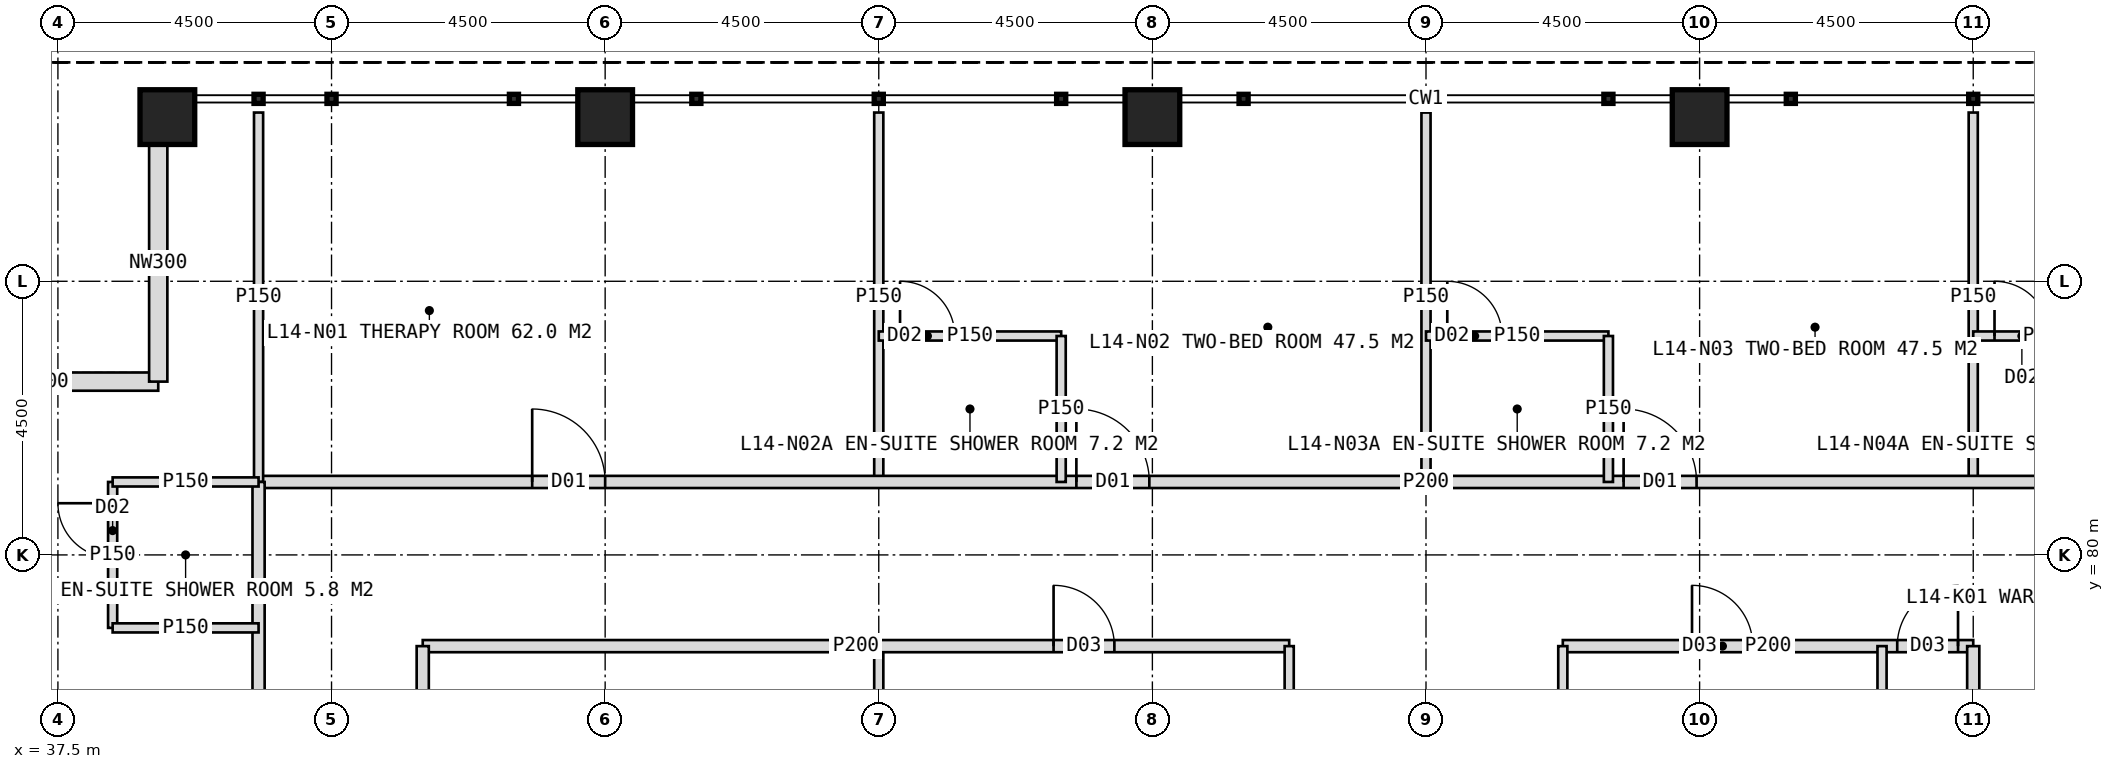
"""IFC4 building model, lengths in metres.
Left out: names, types, materials, properties, quantities, classifications, styles, units other than length and angle.
Written with IfcOpenShell. Run it as: python <this file> out.ifc"""

import sys

from ifc_helpers import new_model, si_unit, direction, frame, frame_2d, origin, origin_2d, place, context, subcontext, project, spatial, rectangle, hollow_rectangle, extrude, element, fill, save


model = new_model("IFC4")
c1 = context("Model", 3, precision=1e-05, world=origin(), true_north=direction((0.0, 1.0)))
c2 = subcontext(c1, "Body", "Model", "MODEL_VIEW")
j1 = project(units=[si_unit("LENGTHUNIT", "METRE"), si_unit("PLANEANGLEUNIT", "RADIAN")], contexts=[c1])
p1 = place(None, origin())
s1 = spatial("IfcSite", under=j1, at=p1, CompositionType="ELEMENT")
p2 = place(p1, origin())
s2 = spatial("IfcBuilding", under=s1, at=p2, CompositionType="ELEMENT")
p3 = place(p2, frame((0.0, 0.0, 63.0)))
s3 = spatial("IfcBuildingStorey", under=s2, at=p3, CompositionType="ELEMENT", Elevation=63.0)
for number, where, z_axis, x_axis in (
    (1, (39.3, 87.2, 0.0), (0.0, 0.0, 1.0), (1.0, 0.0, 0.0)),
    (2, (46.5, 87.2, 0.0), (0.0, 0.0, 1.0), (1.0, 0.0, 0.0)),
    (3, (55.5, 87.2, 0.0), (0.0, 0.0, 1.0), (1.0, 0.0, 0.0)),
    (4, (64.5, 87.2, 0.0), (0.0, 0.0, 1.0), (1.0, 0.0, 0.0)),
):
    element("IfcColumn", number, at=place(p3, frame(where, z_axis=z_axis, x_axis=x_axis)), inside=s3, PredefinedType="COLUMN", context=c2, shape_type="SweptSolid", body=[
        extrude(hollow_rectangle(XDim=0.9, YDim=0.9, WallThickness=0.08, at=origin_2d()), origin(), (0.0, 0.0, 1.0), 4.0),
    ])
for number, where, z_axis, x_axis in (
    (5, (35.25, 82.85, 0.0), (0.0, 0.0, 1.0), (1.0, 0.0, 0.0)),
    (6, (39.15, 82.85, 0.0), (0.0, 0.0, 1.0), (0.0, 1.0, 0.0)),
):
    element("IfcWall", number, at=place(p3, frame(where, z_axis=z_axis, x_axis=x_axis)), inside=s3, PredefinedType="ELEMENTEDWALL", context=c2, shape_type="SweptSolid", body=[
        extrude(rectangle(XDim=3.9, YDim=0.3, at=frame_2d((1.95, 0.0))), origin(), (0.0, 0.0, 1.0), 2.95),
    ])
p4 = place(p3, frame((51.0, 81.2, 0.0), z_axis=(0.0, 0.0, 1.0), x_axis=(0.0, 1.0, 0.0)))
e7 = element("IfcWall", 7, at=p4, inside=s3, PredefinedType="PARTITIONING", context=c2, shape_type="SweptSolid", body=[
    extrude(rectangle(XDim=6.075, YDim=0.15, at=frame_2d((3.038, 0.0))), origin(), (0.0, 0.0, 1.0), 3.75),
])
p5 = place(p3, frame((60.0, 81.2, 0.0), z_axis=(0.0, 0.0, 1.0), x_axis=(0.0, 1.0, 0.0)))
e8 = element("IfcWall", 8, at=p5, inside=s3, PredefinedType="PARTITIONING", context=c2, shape_type="SweptSolid", body=[
    extrude(rectangle(XDim=6.075, YDim=0.15, at=frame_2d((3.038, 0.0))), origin(), (0.0, 0.0, 1.0), 2.75),
])
p6 = place(p3, frame((69.0, 81.2, 0.0), z_axis=(0.0, 0.0, 1.0), x_axis=(0.0, 1.0, 0.0)))
e9 = element("IfcWall", 9, at=p6, inside=s3, PredefinedType="PARTITIONING", context=c2, shape_type="SweptSolid", body=[
    extrude(rectangle(XDim=6.075, YDim=0.15, at=frame_2d((3.038, 0.0))), origin(), (0.0, 0.0, 1.0), 3.75),
])
p7 = place(p3, frame((40.8, 81.2, 0.0), z_axis=(0.0, 0.0, 1.0), x_axis=(1.0, 0.0, 0.0)))
e10 = element("IfcWall", 10, at=p7, inside=s3, PredefinedType="PARTITIONING", context=c2, shape_type="SweptSolid", body=[
    extrude(rectangle(XDim=38.4, YDim=0.2, at=frame_2d((19.2, 0.0))), origin(), (0.0, 0.0, 1.0), 3.75),
])
p8 = place(p7, frame((4.5, 0.0, 0.0)))
e11 = element("IfcOpeningElement", 11, at=p8, cuts=e10, PredefinedType="OPENING", context=c2, shape_type="SweptSolid", body=[
    extrude(rectangle(XDim=1.2, YDim=2.2, at=frame_2d((0.6, 1.1))), frame((0.0, 0.11, 0.0), z_axis=(0.0, -1.0, 0.0), x_axis=(1.0, 0.0, 0.0)), (0.0, 0.0, 1.0), 0.22),
])
p9 = place(p7, frame((13.45, 0.0, 0.0)))
e12 = element("IfcOpeningElement", 12, at=p9, cuts=e10, PredefinedType="OPENING", context=c2, shape_type="SweptSolid", body=[
    extrude(rectangle(XDim=1.2, YDim=2.2, at=frame_2d((0.6, 1.1))), frame((0.0, 0.11, 0.0), z_axis=(0.0, -1.0, 0.0), x_axis=(1.0, 0.0, 0.0)), (0.0, 0.0, 1.0), 0.22),
])
p10 = place(p7, frame((22.45, 0.0, 0.0)))
e13 = element("IfcOpeningElement", 13, at=p10, cuts=e10, PredefinedType="OPENING", context=c2, shape_type="SweptSolid", body=[
    extrude(rectangle(XDim=1.2, YDim=2.2, at=frame_2d((0.6, 1.1))), frame((0.0, 0.11, 0.0), z_axis=(0.0, -1.0, 0.0), x_axis=(1.0, 0.0, 0.0)), (0.0, 0.0, 1.0), 0.22),
])
p11 = place(p7, frame((30.85, 0.0, 0.0)))
e14 = element("IfcOpeningElement", 14, at=p11, cuts=e10, PredefinedType="OPENING", context=c2, shape_type="SweptSolid", body=[
    extrude(rectangle(XDim=1.2, YDim=2.2, at=frame_2d((0.6, 1.1))), frame((0.0, 0.11, 0.0), z_axis=(0.0, -1.0, 0.0), x_axis=(1.0, 0.0, 0.0)), (0.0, 0.0, 1.0), 0.22),
])
p12 = place(p3, frame((40.8, 81.2, 0.0), z_axis=(0.0, 0.0, 1.0), x_axis=(0.0, 1.0, 0.0)))
e15 = element("IfcWall", 15, at=p12, inside=s3, PredefinedType="PARTITIONING", context=c2, shape_type="SweptSolid", body=[
    extrude(rectangle(XDim=6.075, YDim=0.15, at=frame_2d((3.038, 0.0))), origin(), (0.0, 0.0, 1.0), 3.75),
])
p13 = place(p3, frame((51.0, 83.6, 0.0), z_axis=(0.0, 0.0, 1.0), x_axis=(1.0, 0.0, 0.0)))
e16 = element("IfcWall", 16, at=p13, inside=s3, PredefinedType="PARTITIONING", context=c2, shape_type="SweptSolid", body=[
    extrude(rectangle(XDim=3.0, YDim=0.15, at=frame_2d((1.5, 0.0))), origin(), (0.0, 0.0, 1.0), 3.75),
])
p14 = place(p13, frame((0.35, 0.0, 0.0)))
e17 = element("IfcOpeningElement", 17, at=p14, cuts=e16, PredefinedType="OPENING", context=c2, shape_type="SweptSolid", body=[
    extrude(rectangle(XDim=0.9, YDim=2.1, at=frame_2d((0.45, 1.05))), frame((0.0, 0.085, 0.0), z_axis=(0.0, -1.0, 0.0), x_axis=(1.0, 0.0, 0.0)), (0.0, 0.0, 1.0), 0.17),
])
p15 = place(p3, frame((54.0, 81.2, 0.0), z_axis=(0.0, 0.0, 1.0), x_axis=(0.0, 1.0, 0.0)))
e18 = element("IfcWall", 18, at=p15, inside=s3, PredefinedType="PARTITIONING", context=c2, shape_type="SweptSolid", body=[
    extrude(rectangle(XDim=2.4, YDim=0.15, at=frame_2d((1.2, 0.0))), origin(), (0.0, 0.0, 1.0), 3.75),
])
p16 = place(p3, frame((60.0, 83.6, 0.0), z_axis=(0.0, 0.0, 1.0), x_axis=(1.0, 0.0, 0.0)))
e19 = element("IfcWall", 19, at=p16, inside=s3, PredefinedType="PARTITIONING", context=c2, shape_type="SweptSolid", body=[
    extrude(rectangle(XDim=3.0, YDim=0.15, at=frame_2d((1.5, 0.0))), origin(), (0.0, 0.0, 1.0), 3.75),
])
p17 = place(p16, frame((0.35, 0.0, 0.0)))
e20 = element("IfcOpeningElement", 20, at=p17, cuts=e19, PredefinedType="OPENING", context=c2, shape_type="SweptSolid", body=[
    extrude(rectangle(XDim=0.9, YDim=2.1, at=frame_2d((0.45, 1.05))), frame((0.0, 0.085, 0.0), z_axis=(0.0, -1.0, 0.0), x_axis=(1.0, 0.0, 0.0)), (0.0, 0.0, 1.0), 0.17),
])
p18 = place(p3, frame((63.0, 81.2, 0.0), z_axis=(0.0, 0.0, 1.0), x_axis=(0.0, 1.0, 0.0)))
e21 = element("IfcWall", 21, at=p18, inside=s3, PredefinedType="PARTITIONING", context=c2, shape_type="SweptSolid", body=[
    extrude(rectangle(XDim=2.4, YDim=0.15, at=frame_2d((1.2, 0.0))), origin(), (0.0, 0.0, 1.0), 3.75),
])
p19 = place(p3, frame((69.0, 83.6, 0.0), z_axis=(0.0, 0.0, 1.0), x_axis=(1.0, 0.0, 0.0)))
e22 = element("IfcWall", 22, at=p19, inside=s3, PredefinedType="PARTITIONING", context=c2, shape_type="SweptSolid", body=[
    extrude(rectangle(XDim=2.4, YDim=0.15, at=frame_2d((1.2, 0.0))), origin(), (0.0, 0.0, 1.0), 3.75),
])
p20 = place(p19, frame((0.35, 0.0, 0.0)))
e23 = element("IfcOpeningElement", 23, at=p20, cuts=e22, PredefinedType="OPENING", context=c2, shape_type="SweptSolid", body=[
    extrude(rectangle(XDim=0.9, YDim=2.1, at=frame_2d((0.45, 1.05))), frame((0.0, 0.085, 0.0), z_axis=(0.0, -1.0, 0.0), x_axis=(1.0, 0.0, 0.0)), (0.0, 0.0, 1.0), 0.17),
])
p21 = place(p3, frame((51.0, 71.0, 0.0), z_axis=(0.0, 0.0, 1.0), x_axis=(0.0, 1.0, 0.0)))
e24 = element("IfcWall", 24, at=p21, inside=s3, PredefinedType="PARTITIONING", context=c2, shape_type="SweptSolid", body=[
    extrude(rectangle(XDim=7.5, YDim=0.15, at=frame_2d((3.75, 0.0))), origin(), (0.0, 0.0, 1.0), 3.75),
])
p22 = place(p3, frame((43.5, 78.5, 0.0), z_axis=(0.0, 0.0, 1.0), x_axis=(1.0, 0.0, 0.0)))
e25 = element("IfcWall", 25, at=p22, inside=s3, PredefinedType="PARTITIONING", context=c2, shape_type="SweptSolid", body=[
    extrude(rectangle(XDim=14.25, YDim=0.2, at=frame_2d((7.125, 0.0))), origin(), (0.0, 0.0, 1.0), 3.75),
])
p23 = place(p22, frame((10.375, 0.0, 0.0)))
e26 = element("IfcOpeningElement", 26, at=p23, cuts=e25, PredefinedType="OPENING", context=c2, shape_type="SweptSolid", body=[
    extrude(rectangle(XDim=1.0, YDim=2.1, at=frame_2d((0.5, 1.05))), frame((0.0, 0.11, 0.0), z_axis=(0.0, -1.0, 0.0), x_axis=(1.0, 0.0, 0.0)), (0.0, 0.0, 1.0), 0.22),
])
p24 = place(p3, frame((62.25, 78.5, 0.0), z_axis=(0.0, 0.0, 1.0), x_axis=(1.0, 0.0, 0.0)))
e27 = element("IfcWall", 27, at=p24, inside=s3, PredefinedType="PARTITIONING", context=c2, shape_type="SweptSolid", body=[
    extrude(rectangle(XDim=6.75, YDim=0.2, at=frame_2d((3.375, 0.0))), origin(), (0.0, 0.0, 1.0), 3.75),
])
p25 = place(p24, frame((2.125, 0.0, 0.0)))
e28 = element("IfcOpeningElement", 28, at=p25, cuts=e27, PredefinedType="OPENING", context=c2, shape_type="SweptSolid", body=[
    extrude(rectangle(XDim=1.0, YDim=2.1, at=frame_2d((0.5, 1.05))), frame((0.0, 0.11, 0.0), z_axis=(0.0, -1.0, 0.0), x_axis=(1.0, 0.0, 0.0)), (0.0, 0.0, 1.0), 0.22),
])
p26 = place(p24, frame((5.5, 0.0, 0.0)))
e29 = element("IfcOpeningElement", 29, at=p26, cuts=e27, PredefinedType="OPENING", context=c2, shape_type="SweptSolid", body=[
    extrude(rectangle(XDim=1.0, YDim=2.1, at=frame_2d((0.5, 1.05))), frame((0.0, 0.11, 0.0), z_axis=(0.0, -1.0, 0.0), x_axis=(1.0, 0.0, 0.0)), (0.0, 0.0, 1.0), 0.22),
])
p27 = place(p3, frame((57.75, 71.0, 0.0), z_axis=(0.0, 0.0, 1.0), x_axis=(0.0, 1.0, 0.0)))
e30 = element("IfcWall", 30, at=p27, inside=s3, PredefinedType="PARTITIONING", context=c2, shape_type="SweptSolid", body=[
    extrude(rectangle(XDim=7.5, YDim=0.15, at=frame_2d((3.75, 0.0))), origin(), (0.0, 0.0, 1.0), 3.75),
])
p28 = place(p27, frame((0.6, 0.0, 0.0)))
e31 = element("IfcOpeningElement", 31, at=p28, cuts=e30, PredefinedType="OPENING", context=c2, shape_type="SweptSolid", body=[
    extrude(rectangle(XDim=0.9, YDim=2.1, at=frame_2d((0.45, 1.05))), frame((0.0, 0.085, 0.0), z_axis=(0.0, -1.0, 0.0), x_axis=(1.0, 0.0, 0.0)), (0.0, 0.0, 1.0), 0.17),
])
p29 = place(p3, frame((62.25, 71.0, 0.0), z_axis=(0.0, 0.0, 1.0), x_axis=(0.0, 1.0, 0.0)))
e32 = element("IfcWall", 32, at=p29, inside=s3, PredefinedType="PARTITIONING", context=c2, shape_type="SweptSolid", body=[
    extrude(rectangle(XDim=7.5, YDim=0.15, at=frame_2d((3.75, 0.0))), origin(), (0.0, 0.0, 1.0), 3.75),
])
p30 = place(p29, frame((0.6, 0.0, 0.0)))
e33 = element("IfcOpeningElement", 33, at=p30, cuts=e32, PredefinedType="OPENING", context=c2, shape_type="SweptSolid", body=[
    extrude(rectangle(XDim=0.9, YDim=2.1, at=frame_2d((0.45, 1.05))), frame((0.0, 0.085, 0.0), z_axis=(0.0, -1.0, 0.0), x_axis=(1.0, 0.0, 0.0)), (0.0, 0.0, 1.0), 0.17),
])
p31 = place(p3, frame((67.5, 71.0, 0.0), z_axis=(0.0, 0.0, 1.0), x_axis=(0.0, 1.0, 0.0)))
e34 = element("IfcWall", 34, at=p31, inside=s3, PredefinedType="PARTITIONING", context=c2, shape_type="SweptSolid", body=[
    extrude(rectangle(XDim=7.5, YDim=0.15, at=frame_2d((3.75, 0.0))), origin(), (0.0, 0.0, 1.0), 3.75),
])
p32 = place(p3, frame((40.8, 42.8, 0.0), z_axis=(0.0, 0.0, 1.0), x_axis=(0.0, 1.0, 0.0)))
e35 = element("IfcWall", 35, at=p32, inside=s3, PredefinedType="PARTITIONING", context=c2, shape_type="SweptSolid", body=[
    extrude(rectangle(XDim=38.4, YDim=0.2, at=frame_2d((19.2, 0.0))), origin(), (0.0, 0.0, 1.0), 3.75),
])
p33 = place(p32, frame((3.25, 0.0, 0.0)))
e36 = element("IfcOpeningElement", 36, at=p33, cuts=e35, PredefinedType="OPENING", context=c2, shape_type="SweptSolid", body=[
    extrude(rectangle(XDim=1.2, YDim=2.2, at=frame_2d((0.6, 1.1))), frame((0.0, 0.11, 0.0), z_axis=(0.0, -1.0, 0.0), x_axis=(1.0, 0.0, 0.0)), (0.0, 0.0, 1.0), 0.22),
])
p34 = place(p32, frame((9.85, 0.0, 0.0)))
e37 = element("IfcOpeningElement", 37, at=p34, cuts=e35, PredefinedType="OPENING", context=c2, shape_type="SweptSolid", body=[
    extrude(rectangle(XDim=1.2, YDim=2.2, at=frame_2d((0.6, 1.1))), frame((0.0, 0.11, 0.0), z_axis=(0.0, -1.0, 0.0), x_axis=(1.0, 0.0, 0.0)), (0.0, 0.0, 1.0), 0.22),
])
p35 = place(p32, frame((15.85, 0.0, 0.0)))
e38 = element("IfcOpeningElement", 38, at=p35, cuts=e35, PredefinedType="OPENING", context=c2, shape_type="SweptSolid", body=[
    extrude(rectangle(XDim=1.2, YDim=2.2, at=frame_2d((0.6, 1.1))), frame((0.0, 0.11, 0.0), z_axis=(0.0, -1.0, 0.0), x_axis=(1.0, 0.0, 0.0)), (0.0, 0.0, 1.0), 0.22),
])
p36 = place(p32, frame((22.45, 0.0, 0.0)))
e39 = element("IfcOpeningElement", 39, at=p36, cuts=e35, PredefinedType="OPENING", context=c2, shape_type="SweptSolid", body=[
    extrude(rectangle(XDim=1.2, YDim=2.2, at=frame_2d((0.6, 1.1))), frame((0.0, 0.11, 0.0), z_axis=(0.0, -1.0, 0.0), x_axis=(1.0, 0.0, 0.0)), (0.0, 0.0, 1.0), 0.22),
])
p37 = place(p32, frame((30.85, 0.0, 0.0)))
e40 = element("IfcOpeningElement", 40, at=p37, cuts=e35, PredefinedType="OPENING", context=c2, shape_type="SweptSolid", body=[
    extrude(rectangle(XDim=1.2, YDim=2.2, at=frame_2d((0.6, 1.1))), frame((0.0, 0.11, 0.0), z_axis=(0.0, -1.0, 0.0), x_axis=(1.0, 0.0, 0.0)), (0.0, 0.0, 1.0), 0.22),
])
p38 = place(p3, frame((38.4, 78.8, 0.0), z_axis=(0.0, 0.0, 1.0), x_axis=(0.0, 1.0, 0.0)))
e41 = element("IfcWall", 41, at=p38, inside=s3, PredefinedType="PARTITIONING", context=c2, shape_type="SweptSolid", body=[
    extrude(rectangle(XDim=2.4, YDim=0.15, at=frame_2d((1.2, 0.0))), origin(), (0.0, 0.0, 1.0), 3.75),
])
p39 = place(p38, frame((1.15, 0.0, 0.0)))
e42 = element("IfcOpeningElement", 42, at=p39, cuts=e41, PredefinedType="OPENING", context=c2, shape_type="SweptSolid", body=[
    extrude(rectangle(XDim=0.9, YDim=2.1, at=frame_2d((0.45, 1.05))), frame((0.0, 0.085, 0.0), z_axis=(0.0, -1.0, 0.0), x_axis=(1.0, 0.0, 0.0)), (0.0, 0.0, 1.0), 0.17),
])
for number, where, z_axis, x_axis in (
    (43, (40.8, 78.8, 0.0), (0.0, 0.0, 1.0), (-1.0, 0.0, 0.0)),
    (44, (40.8, 81.2, 0.0), (0.0, 0.0, 1.0), (-1.0, 0.0, 0.0)),
):
    element("IfcWall", number, at=place(p3, frame(where, z_axis=z_axis, x_axis=x_axis)), inside=s3, PredefinedType="PARTITIONING", context=c2, shape_type="SweptSolid", body=[
        extrude(rectangle(XDim=2.4, YDim=0.15, at=frame_2d((1.2, 0.0))), origin(), (0.0, 0.0, 1.0), 3.75),
    ])
p40 = place(p3, frame((43.5, 62.0, 0.0), z_axis=(0.0, 0.0, 1.0), x_axis=(0.0, 1.0, 0.0)))
e45 = element("IfcWall", 45, at=p40, inside=s3, PredefinedType="PARTITIONING", context=c2, shape_type="SweptSolid", body=[
    extrude(rectangle(XDim=16.5, YDim=0.2, at=frame_2d((8.25, 0.0))), origin(), (0.0, 0.0, 1.0), 3.75),
])
p41 = place(p40, frame((2.5, 0.0, 0.0)))
e46 = element("IfcOpeningElement", 46, at=p41, cuts=e45, PredefinedType="OPENING", context=c2, shape_type="SweptSolid", body=[
    extrude(rectangle(XDim=1.0, YDim=2.1, at=frame_2d((0.5, 1.05))), frame((0.0, 0.11, 0.0), z_axis=(0.0, -1.0, 0.0), x_axis=(1.0, 0.0, 0.0)), (0.0, 0.0, 1.0), 0.22),
])
p42 = place(p40, frame((7.75, 0.0, 0.0)))
e47 = element("IfcOpeningElement", 47, at=p42, cuts=e45, PredefinedType="OPENING", context=c2, shape_type="SweptSolid", body=[
    extrude(rectangle(XDim=1.0, YDim=2.1, at=frame_2d((0.5, 1.05))), frame((0.0, 0.11, 0.0), z_axis=(0.0, -1.0, 0.0), x_axis=(1.0, 0.0, 0.0)), (0.0, 0.0, 1.0), 0.22),
])
p43 = place(p40, frame((13.0, 0.0, 0.0)))
e48 = element("IfcOpeningElement", 48, at=p43, cuts=e45, PredefinedType="OPENING", context=c2, shape_type="SweptSolid", body=[
    extrude(rectangle(XDim=1.0, YDim=2.1, at=frame_2d((0.5, 1.05))), frame((0.0, 0.11, 0.0), z_axis=(0.0, -1.0, 0.0), x_axis=(1.0, 0.0, 0.0)), (0.0, 0.0, 1.0), 0.22),
])
p44 = place(p3, frame((69.0, 75.1, 0.0), z_axis=(0.0, 0.0, 1.0), x_axis=(0.0, 1.0, 0.0)))
e49 = element("IfcWall", 49, at=p44, inside=s3, PredefinedType="PARTITIONING", context=c2, shape_type="SweptSolid", body=[
    extrude(rectangle(XDim=3.4, YDim=0.2, at=frame_2d((1.7, 0.0))), origin(), (0.0, 0.0, 1.0), 3.75),
])
p45 = place(p8, origin())
e50 = element("IfcDoor", 50, at=p45, inside=s3, OperationType="SINGLE_SWING_LEFT", PredefinedType="DOOR", context=c2, shape_type="SweptSolid", body=[
    extrude(rectangle(XDim=1.2, YDim=2.2, at=frame_2d((0.6, 1.1))), frame((0.0, 0.025, 0.0), z_axis=(0.0, -1.0, 0.0), x_axis=(1.0, 0.0, 0.0)), (0.0, 0.0, 1.0), 0.05),
])
fill(e11, e50)
p46 = place(p9, origin())
e51 = element("IfcDoor", 51, at=p46, inside=s3, OperationType="SINGLE_SWING_LEFT", PredefinedType="DOOR", context=c2, shape_type="SweptSolid", body=[
    extrude(rectangle(XDim=1.2, YDim=2.2, at=frame_2d((0.6, 1.1))), frame((0.0, 0.025, 0.0), z_axis=(0.0, -1.0, 0.0), x_axis=(1.0, 0.0, 0.0)), (0.0, 0.0, 1.0), 0.05),
])
fill(e12, e51)
p47 = place(p14, origin())
e52 = element("IfcDoor", 52, at=p47, inside=s3, OperationType="SINGLE_SWING_LEFT", PredefinedType="DOOR", context=c2, shape_type="SweptSolid", body=[
    extrude(rectangle(XDim=0.9, YDim=2.1, at=frame_2d((0.45, 1.05))), frame((0.0, 0.025, 0.0), z_axis=(0.0, -1.0, 0.0), x_axis=(1.0, 0.0, 0.0)), (0.0, 0.0, 1.0), 0.05),
])
fill(e17, e52)
p48 = place(p10, origin())
e53 = element("IfcDoor", 53, at=p48, inside=s3, OperationType="SINGLE_SWING_LEFT", PredefinedType="DOOR", context=c2, shape_type="SweptSolid", body=[
    extrude(rectangle(XDim=1.2, YDim=2.2, at=frame_2d((0.6, 1.1))), frame((0.0, 0.025, 0.0), z_axis=(0.0, -1.0, 0.0), x_axis=(1.0, 0.0, 0.0)), (0.0, 0.0, 1.0), 0.05),
])
fill(e13, e53)
p49 = place(p17, origin())
e54 = element("IfcDoor", 54, at=p49, inside=s3, OperationType="SINGLE_SWING_LEFT", PredefinedType="DOOR", context=c2, shape_type="SweptSolid", body=[
    extrude(rectangle(XDim=0.9, YDim=2.1, at=frame_2d((0.45, 1.05))), frame((0.0, 0.025, 0.0), z_axis=(0.0, -1.0, 0.0), x_axis=(1.0, 0.0, 0.0)), (0.0, 0.0, 1.0), 0.05),
])
fill(e20, e54)
p50 = place(p20, origin())
e55 = element("IfcDoor", 55, at=p50, inside=s3, OperationType="SINGLE_SWING_LEFT", PredefinedType="DOOR", context=c2, shape_type="SweptSolid", body=[
    extrude(rectangle(XDim=0.9, YDim=2.1, at=frame_2d((0.45, 1.05))), frame((0.0, 0.025, 0.0), z_axis=(0.0, -1.0, 0.0), x_axis=(1.0, 0.0, 0.0)), (0.0, 0.0, 1.0), 0.05),
])
fill(e23, e55)
p51 = place(p23, origin())
e56 = element("IfcDoor", 56, at=p51, inside=s3, OperationType="SINGLE_SWING_LEFT", PredefinedType="DOOR", context=c2, shape_type="SweptSolid", body=[
    extrude(rectangle(XDim=1.0, YDim=2.1, at=frame_2d((0.5, 1.05))), frame((0.0, 0.025, 0.0), z_axis=(0.0, -1.0, 0.0), x_axis=(1.0, 0.0, 0.0)), (0.0, 0.0, 1.0), 0.05),
])
fill(e26, e56)
p52 = place(p25, origin())
e57 = element("IfcDoor", 57, at=p52, inside=s3, OperationType="SINGLE_SWING_LEFT", PredefinedType="DOOR", context=c2, shape_type="SweptSolid", body=[
    extrude(rectangle(XDim=1.0, YDim=2.1, at=frame_2d((0.5, 1.05))), frame((0.0, 0.025, 0.0), z_axis=(0.0, -1.0, 0.0), x_axis=(1.0, 0.0, 0.0)), (0.0, 0.0, 1.0), 0.05),
])
fill(e28, e57)
p53 = place(p26, origin())
e58 = element("IfcDoor", 58, at=p53, inside=s3, OperationType="SINGLE_SWING_RIGHT", PredefinedType="DOOR", context=c2, shape_type="SweptSolid", body=[
    extrude(rectangle(XDim=1.0, YDim=2.1, at=frame_2d((0.5, 1.05))), frame((0.0, 0.025, 0.0), z_axis=(0.0, -1.0, 0.0), x_axis=(1.0, 0.0, 0.0)), (0.0, 0.0, 1.0), 0.05),
])
fill(e29, e58)
p54 = place(p39, origin())
e59 = element("IfcDoor", 59, at=p54, inside=s3, OperationType="SINGLE_SWING_RIGHT", PredefinedType="DOOR", context=c2, shape_type="SweptSolid", body=[
    extrude(rectangle(XDim=0.9, YDim=2.1, at=frame_2d((0.45, 1.05))), frame((0.0, 0.025, 0.0), z_axis=(0.0, -1.0, 0.0), x_axis=(1.0, 0.0, 0.0)), (0.0, 0.0, 1.0), 0.05),
])
fill(e42, e59)
save(model, sys.argv[1])
